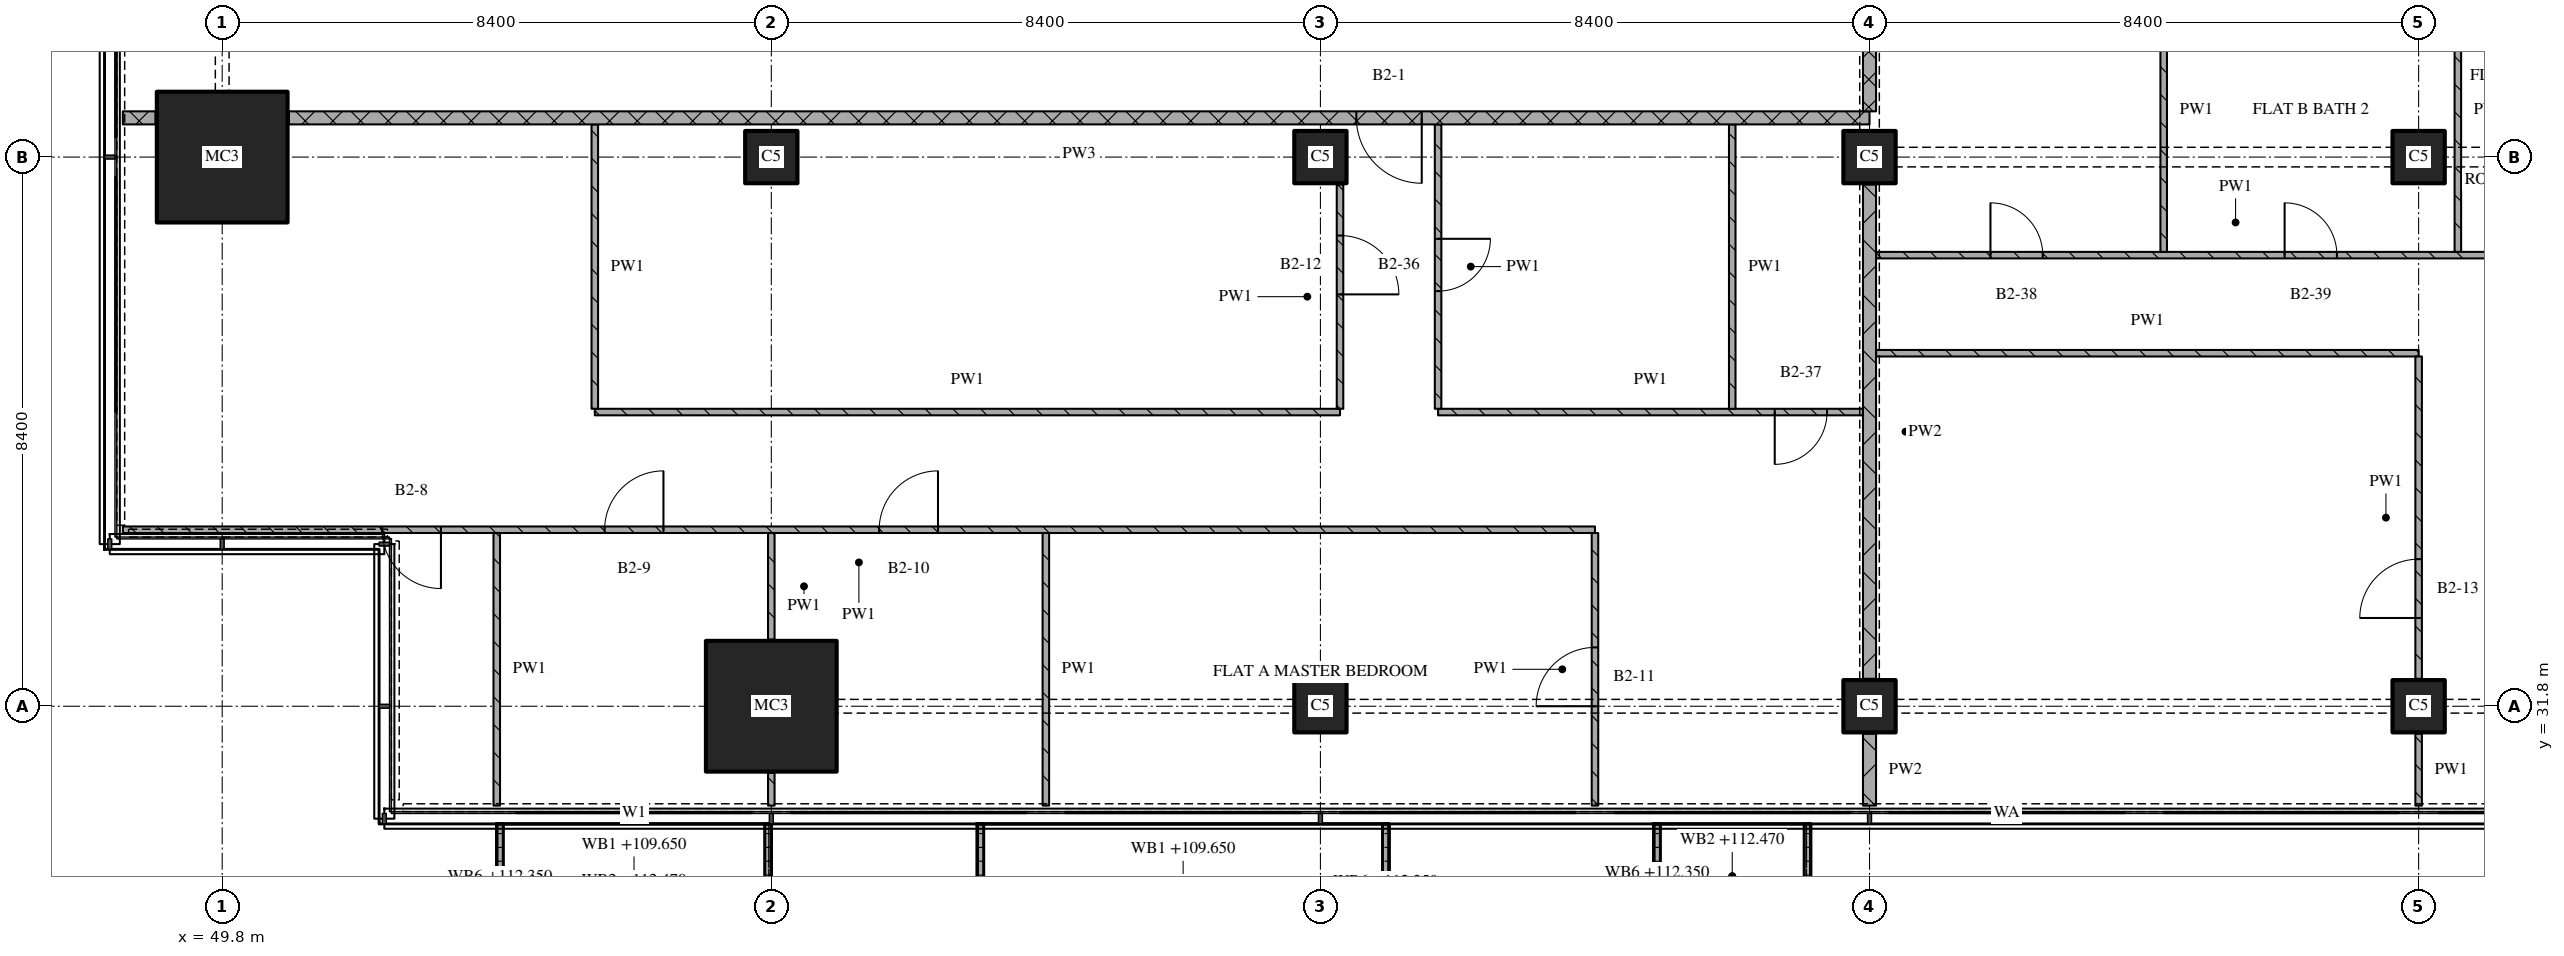
"""IFC4 building model, lengths in metres.
Left out: names, types, materials, properties, quantities, classifications, styles, units other than length and angle.
Written with IfcOpenShell. Run it as: python <this file> out.ifc"""

import sys

from ifc_helpers import new_model, si_unit, direction, frame, frame_2d, origin, origin_2d, place, context, subcontext, project, spatial, polyline, rectangle, outline, extrude, element, fill, save


model = new_model("IFC4")
c1 = context("Model", 3, precision=1e-05, world=origin(), true_north=direction((0.0, 1.0)))
c2 = subcontext(c1, "Body", "Model", "MODEL_VIEW")
j1 = project(units=[si_unit("LENGTHUNIT", "METRE"), si_unit("PLANEANGLEUNIT", "RADIAN")], contexts=[c1])
p1 = place(None, origin())
s1 = spatial("IfcSite", under=j1, at=p1, CompositionType="ELEMENT")
p2 = place(p1, origin())
s2 = spatial("IfcBuilding", under=s1, at=p2, CompositionType="ELEMENT")
p3 = place(p2, frame((0.0, 0.0, 109.65)))
s3 = spatial("IfcBuildingStorey", under=s2, at=p3, CompositionType="ELEMENT", Elevation=109.65)
for number, where, z_axis, x_axis in (
    (1, (49.8, 40.2, 0.0), (0.0, 0.0, 1.0), (1.0, 0.0, 0.0)),
    (2, (58.2, 31.8, 0.0), (0.0, 0.0, 1.0), (1.0, 0.0, 0.0)),
):
    element("IfcColumn", number, at=place(p3, frame(where, z_axis=z_axis, x_axis=x_axis)), inside=s3, PredefinedType="COLUMN", context=c2, shape_type="SweptSolid", body=[
        extrude(rectangle(XDim=2.0, YDim=2.0, at=origin_2d()), origin(), (0.0, 0.0, 1.0), 3.6),
    ])
for number, where, z_axis, x_axis in (
    (3, (58.2, 40.2, 0.0), (0.0, 0.0, 1.0), (1.0, 0.0, 0.0)),
    (4, (66.6, 31.8, 0.0), (0.0, 0.0, 1.0), (1.0, 0.0, 0.0)),
    (5, (66.6, 40.2, 0.0), (0.0, 0.0, 1.0), (1.0, 0.0, 0.0)),
    (6, (75.0, 31.8, 0.0), (0.0, 0.0, 1.0), (1.0, 0.0, 0.0)),
    (7, (75.0, 40.2, 0.0), (0.0, 0.0, 1.0), (1.0, 0.0, 0.0)),
    (8, (83.4, 31.8, 0.0), (0.0, 0.0, 1.0), (1.0, 0.0, 0.0)),
    (9, (83.4, 40.2, 0.0), (0.0, 0.0, 1.0), (1.0, 0.0, 0.0)),
):
    element("IfcColumn", number, at=place(p3, frame(where, z_axis=z_axis, x_axis=x_axis)), inside=s3, PredefinedType="COLUMN", context=c2, shape_type="SweptSolid", body=[
        extrude(rectangle(XDim=0.8, YDim=0.8, at=origin_2d()), origin(), (0.0, 0.0, 1.0), 3.6),
    ])
p4 = place(p3, origin())
e10 = element("IfcWall", 10, at=p4, inside=s3, PredefinedType="SOLIDWALL", context=c2, shape_type="SweptSolid", body=[
    extrude(outline(polyline([(54.0, 30.0), (54.1, 30.0), (54.1, 28.367), (58.1, 28.367), (58.1, 30.0), (58.2, 30.0), (58.2, 28.267), (54.0, 28.267), (54.0, 30.0)])), origin(), (0.0, 0.0, 1.0), 1.0),
])
p5 = place(p3, origin())
e11 = element("IfcWall", 11, at=p5, inside=s3, PredefinedType="SOLIDWALL", context=c2, shape_type="SweptSolid", body=[
    extrude(outline(polyline([(61.35, 30.0), (61.45, 30.0), (61.45, 28.233), (67.55, 28.233), (67.55, 30.0), (67.65, 30.0), (67.65, 28.133), (61.35, 28.133), (61.35, 30.0)])), origin(), (0.0, 0.0, 1.0), 1.0),
])
p6 = place(p3, origin())
e12 = element("IfcWall", 12, at=p6, inside=s3, PredefinedType="SOLIDWALL", context=c2, shape_type="SweptSolid", body=[
    extrude(outline(polyline([(71.7, 30.0), (71.8, 30.0), (71.8, 28.5), (74.0, 28.5), (74.0, 30.0), (74.1, 30.0), (74.1, 28.4), (71.7, 28.4), (71.7, 30.0)])), origin(), (0.0, 0.0, 1.0), 1.0),
])
p7 = place(p3, frame((70.8, 34.5, 0.0), z_axis=(0.0, 0.0, 1.0), x_axis=(-1.0, 0.0, 0.0)))
e13 = element("IfcWall", 13, at=p7, inside=s3, PredefinedType="PARTITIONING", context=c2, shape_type="SweptSolid", body=[
    extrude(rectangle(XDim=22.52, YDim=0.1, at=frame_2d((11.26, 0.0))), origin(), (0.0, 0.0, 1.0), 3.32),
])
p8 = place(p7, frame((10.05, 0.0, 0.0)))
e14 = element("IfcOpeningElement", 14, at=p8, cuts=e13, PredefinedType="OPENING", context=c2, shape_type="SweptSolid", body=[
    extrude(rectangle(XDim=0.9, YDim=2.1, at=frame_2d((0.45, 1.05))), frame((0.0, 0.06, 0.0), z_axis=(0.0, -1.0, 0.0), x_axis=(1.0, 0.0, 0.0)), (0.0, 0.0, 1.0), 0.12),
])
p9 = place(p7, frame((14.25, 0.0, 0.0)))
e15 = element("IfcOpeningElement", 15, at=p9, cuts=e13, PredefinedType="OPENING", context=c2, shape_type="SweptSolid", body=[
    extrude(rectangle(XDim=0.9, YDim=2.1, at=frame_2d((0.45, 1.05))), frame((0.0, 0.06, 0.0), z_axis=(0.0, -1.0, 0.0), x_axis=(1.0, 0.0, 0.0)), (0.0, 0.0, 1.0), 0.12),
])
p10 = place(p7, frame((17.654, 0.0, 0.0)))
e16 = element("IfcOpeningElement", 16, at=p10, cuts=e13, PredefinedType="OPENING", context=c2, shape_type="SweptSolid", body=[
    extrude(rectangle(XDim=0.9, YDim=2.1, at=frame_2d((0.45, 1.05))), frame((0.0, 0.06, 0.0), z_axis=(0.0, -1.0, 0.0), x_axis=(1.0, 0.0, 0.0)), (0.0, 0.0, 1.0), 0.12),
])
p11 = place(p3, frame((55.5, 36.3, 0.0), z_axis=(0.0, 0.0, 1.0), x_axis=(1.0, 0.0, 0.0)))
e17 = element("IfcWall", 17, at=p11, inside=s3, PredefinedType="PARTITIONING", context=c2, shape_type="SweptSolid", body=[
    extrude(rectangle(XDim=11.4, YDim=0.1, at=frame_2d((5.7, 0.0))), origin(), (0.0, 0.0, 1.0), 3.32),
])
p12 = place(p3, frame((68.4, 36.3, 0.0), z_axis=(0.0, 0.0, 1.0), x_axis=(1.0, 0.0, 0.0)))
e18 = element("IfcWall", 18, at=p12, inside=s3, PredefinedType="PARTITIONING", context=c2, shape_type="SweptSolid", body=[
    extrude(rectangle(XDim=6.5, YDim=0.1, at=frame_2d((3.25, 0.0))), origin(), (0.0, 0.0, 1.0), 3.32),
])
p13 = place(p12, frame((5.15, 0.0, 0.0)))
e19 = element("IfcOpeningElement", 19, at=p13, cuts=e18, PredefinedType="OPENING", context=c2, shape_type="SweptSolid", body=[
    extrude(rectangle(XDim=0.8, YDim=2.1, at=frame_2d((0.4, 1.05))), frame((0.0, 0.06, 0.0), z_axis=(0.0, -1.0, 0.0), x_axis=(1.0, 0.0, 0.0)), (0.0, 0.0, 1.0), 0.12),
])
p14 = place(p3, frame((75.1, 37.2, 0.0), z_axis=(0.0, 0.0, 1.0), x_axis=(1.0, 0.0, 0.0)))
e20 = element("IfcWall", 20, at=p14, inside=s3, PredefinedType="PARTITIONING", context=c2, shape_type="SweptSolid", body=[
    extrude(rectangle(XDim=8.3, YDim=0.1, at=frame_2d((4.15, 0.0))), origin(), (0.0, 0.0, 1.0), 3.32),
])
p15 = place(p3, frame((75.1, 38.7, 0.0), z_axis=(0.0, 0.0, 1.0), x_axis=(1.0, 0.0, 0.0)))
e21 = element("IfcWall", 21, at=p15, inside=s3, PredefinedType="PARTITIONING", context=c2, shape_type="SweptSolid", body=[
    extrude(rectangle(XDim=11.0, YDim=0.1, at=frame_2d((5.5, 0.0))), origin(), (0.0, 0.0, 1.0), 3.32),
])
p16 = place(p15, frame((1.75, 0.0, 0.0)))
e22 = element("IfcOpeningElement", 22, at=p16, cuts=e21, PredefinedType="OPENING", context=c2, shape_type="SweptSolid", body=[
    extrude(rectangle(XDim=0.8, YDim=2.1, at=frame_2d((0.4, 1.05))), frame((0.0, 0.06, 0.0), z_axis=(0.0, -1.0, 0.0), x_axis=(1.0, 0.0, 0.0)), (0.0, 0.0, 1.0), 0.12),
])
p17 = place(p15, frame((6.25, 0.0, 0.0)))
e23 = element("IfcOpeningElement", 23, at=p17, cuts=e21, PredefinedType="OPENING", context=c2, shape_type="SweptSolid", body=[
    extrude(rectangle(XDim=0.8, YDim=2.1, at=frame_2d((0.4, 1.05))), frame((0.0, 0.06, 0.0), z_axis=(0.0, -1.0, 0.0), x_axis=(1.0, 0.0, 0.0)), (0.0, 0.0, 1.0), 0.12),
])
p18 = place(p3, frame((48.28, 40.8, 0.0), z_axis=(0.0, 0.0, 1.0), x_axis=(1.0, 0.0, 0.0)))
e24 = element("IfcWall", 24, at=p18, inside=s3, PredefinedType="PARTITIONING", context=c2, shape_type="SweptSolid", body=[
    extrude(rectangle(XDim=0.5, YDim=0.2, at=frame_2d((0.25, 0.0))), origin(), (0.0, 0.0, 1.0), 3.32),
])
p19 = place(p3, frame((75.0, 40.8, 0.0), z_axis=(0.0, 0.0, 1.0), x_axis=(-1.0, 0.0, 0.0)))
e25 = element("IfcWall", 25, at=p19, inside=s3, PredefinedType="PARTITIONING", context=c2, shape_type="SweptSolid", body=[
    extrude(rectangle(XDim=24.18, YDim=0.2, at=frame_2d((12.09, 0.0))), origin(), (0.0, 0.0, 1.0), 3.32),
])
p20 = place(p19, frame((6.85, 0.0, 0.0)))
e26 = element("IfcOpeningElement", 26, at=p20, cuts=e25, PredefinedType="OPENING", context=c2, shape_type="SweptSolid", body=[
    extrude(rectangle(XDim=1.0, YDim=2.1, at=frame_2d((0.5, 1.05))), frame((0.0, 0.11, 0.0), z_axis=(0.0, -1.0, 0.0), x_axis=(1.0, 0.0, 0.0)), (0.0, 0.0, 1.0), 0.22),
])
p21 = place(p3, frame((54.0, 34.45, 0.0), z_axis=(0.0, 0.0, 1.0), x_axis=(0.0, -1.0, 0.0)))
e27 = element("IfcWall", 27, at=p21, inside=s3, PredefinedType="PARTITIONING", context=c2, shape_type="SweptSolid", body=[
    extrude(rectangle(XDim=4.17, YDim=0.1, at=frame_2d((2.085, 0.0))), origin(), (0.0, 0.0, 1.0), 3.32),
])
p22 = place(p3, frame((55.5, 40.7, 0.0), z_axis=(0.0, 0.0, 1.0), x_axis=(0.0, -1.0, 0.0)))
e28 = element("IfcWall", 28, at=p22, inside=s3, PredefinedType="PARTITIONING", context=c2, shape_type="SweptSolid", body=[
    extrude(rectangle(XDim=4.35, YDim=0.1, at=frame_2d((2.175, 0.0))), origin(), (0.0, 0.0, 1.0), 3.32),
])
p23 = place(p3, frame((58.2, 30.78, 0.0), z_axis=(0.0, 0.0, 1.0), x_axis=(0.0, -1.0, 0.0)))
e29 = element("IfcWall", 29, at=p23, inside=s3, PredefinedType="PARTITIONING", context=c2, shape_type="SweptSolid", body=[
    extrude(rectangle(XDim=0.5, YDim=0.1, at=frame_2d((0.25, 0.0))), origin(), (0.0, 0.0, 1.0), 3.32),
])
p24 = place(p3, frame((58.2, 34.45, 0.0), z_axis=(0.0, 0.0, 1.0), x_axis=(0.0, -1.0, 0.0)))
e30 = element("IfcWall", 30, at=p24, inside=s3, PredefinedType="PARTITIONING", context=c2, shape_type="SweptSolid", body=[
    extrude(rectangle(XDim=1.63, YDim=0.1, at=frame_2d((0.815, 0.0))), origin(), (0.0, 0.0, 1.0), 3.32),
])
p25 = place(p3, frame((62.4, 34.45, 0.0), z_axis=(0.0, 0.0, 1.0), x_axis=(0.0, -1.0, 0.0)))
e31 = element("IfcWall", 31, at=p25, inside=s3, PredefinedType="PARTITIONING", context=c2, shape_type="SweptSolid", body=[
    extrude(rectangle(XDim=4.17, YDim=0.1, at=frame_2d((2.085, 0.0))), origin(), (0.0, 0.0, 1.0), 3.32),
])
p26 = place(p3, frame((66.9, 36.35, 0.0), z_axis=(0.0, 0.0, 1.0), x_axis=(0.0, 1.0, 0.0)))
e32 = element("IfcWall", 32, at=p26, inside=s3, PredefinedType="PARTITIONING", context=c2, shape_type="SweptSolid", body=[
    extrude(rectangle(XDim=3.43, YDim=0.1, at=frame_2d((1.715, 0.0))), origin(), (0.0, 0.0, 1.0), 3.32),
])
p27 = place(p26, frame((1.75, 0.0, 0.0)))
e33 = element("IfcOpeningElement", 33, at=p27, cuts=e32, PredefinedType="OPENING", context=c2, shape_type="SweptSolid", body=[
    extrude(rectangle(XDim=0.9, YDim=2.1, at=frame_2d((0.45, 1.05))), frame((0.0, 0.06, 0.0), z_axis=(0.0, -1.0, 0.0), x_axis=(1.0, 0.0, 0.0)), (0.0, 0.0, 1.0), 0.12),
])
p28 = place(p3, frame((68.4, 40.7, 0.0), z_axis=(0.0, 0.0, 1.0), x_axis=(0.0, -1.0, 0.0)))
e34 = element("IfcWall", 34, at=p28, inside=s3, PredefinedType="PARTITIONING", context=c2, shape_type="SweptSolid", body=[
    extrude(rectangle(XDim=4.35, YDim=0.1, at=frame_2d((2.175, 0.0))), origin(), (0.0, 0.0, 1.0), 3.32),
])
p29 = place(p28, frame((1.75, 0.0, 0.0)))
e35 = element("IfcOpeningElement", 35, at=p29, cuts=e34, PredefinedType="OPENING", context=c2, shape_type="SweptSolid", body=[
    extrude(rectangle(XDim=0.8, YDim=2.1, at=frame_2d((0.4, 1.05))), frame((0.0, 0.06, 0.0), z_axis=(0.0, -1.0, 0.0), x_axis=(1.0, 0.0, 0.0)), (0.0, 0.0, 1.0), 0.12),
])
p30 = place(p3, frame((70.8, 30.28, 0.0), z_axis=(0.0, 0.0, 1.0), x_axis=(0.0, 1.0, 0.0)))
e36 = element("IfcWall", 36, at=p30, inside=s3, PredefinedType="PARTITIONING", context=c2, shape_type="SweptSolid", body=[
    extrude(rectangle(XDim=4.17, YDim=0.1, at=frame_2d((2.085, 0.0))), origin(), (0.0, 0.0, 1.0), 3.32),
])
p31 = place(p30, frame((1.52, 0.0, 0.0)))
e37 = element("IfcOpeningElement", 37, at=p31, cuts=e36, PredefinedType="OPENING", context=c2, shape_type="SweptSolid", body=[
    extrude(rectangle(XDim=0.9, YDim=2.1, at=frame_2d((0.45, 1.05))), frame((0.0, 0.06, 0.0), z_axis=(0.0, -1.0, 0.0), x_axis=(1.0, 0.0, 0.0)), (0.0, 0.0, 1.0), 0.12),
])
p32 = place(p3, frame((72.9, 40.7, 0.0), z_axis=(0.0, 0.0, 1.0), x_axis=(0.0, -1.0, 0.0)))
e38 = element("IfcWall", 38, at=p32, inside=s3, PredefinedType="PARTITIONING", context=c2, shape_type="SweptSolid", body=[
    extrude(rectangle(XDim=4.35, YDim=0.1, at=frame_2d((2.175, 0.0))), origin(), (0.0, 0.0, 1.0), 3.32),
])
p33 = place(p3, frame((75.0, 43.1, 0.0), z_axis=(0.0, 0.0, 1.0), x_axis=(0.0, -1.0, 0.0)))
e39 = element("IfcWall", 39, at=p33, inside=s3, PredefinedType="PARTITIONING", context=c2, shape_type="SweptSolid", body=[
    extrude(rectangle(XDim=2.2, YDim=0.2, at=frame_2d((1.1, 0.0))), origin(), (0.0, 0.0, 1.0), 2.43),
])
p34 = place(p3, frame((75.0, 31.38, 0.0), z_axis=(0.0, 0.0, 1.0), x_axis=(0.0, -1.0, 0.0)))
e40 = element("IfcWall", 40, at=p34, inside=s3, PredefinedType="PARTITIONING", context=c2, shape_type="SweptSolid", body=[
    extrude(rectangle(XDim=1.1, YDim=0.2, at=frame_2d((0.55, 0.0))), origin(), (0.0, 0.0, 1.0), 3.32),
])
p35 = place(p3, frame((75.0, 39.78, 0.0), z_axis=(0.0, 0.0, 1.0), x_axis=(0.0, -1.0, 0.0)))
e41 = element("IfcWall", 41, at=p35, inside=s3, PredefinedType="PARTITIONING", context=c2, shape_type="SweptSolid", body=[
    extrude(rectangle(XDim=7.56, YDim=0.2, at=frame_2d((3.78, 0.0))), origin(), (0.0, 0.0, 1.0), 2.83),
])
p36 = place(p3, frame((79.5, 43.1, 0.0), z_axis=(0.0, 0.0, 1.0), x_axis=(0.0, -1.0, 0.0)))
e42 = element("IfcWall", 42, at=p36, inside=s3, PredefinedType="PARTITIONING", context=c2, shape_type="SweptSolid", body=[
    extrude(rectangle(XDim=4.35, YDim=0.1, at=frame_2d((2.175, 0.0))), origin(), (0.0, 0.0, 1.0), 3.32),
])
p37 = place(p3, frame((83.4, 31.38, 0.0), z_axis=(0.0, 0.0, 1.0), x_axis=(0.0, -1.0, 0.0)))
e43 = element("IfcWall", 43, at=p37, inside=s3, PredefinedType="PARTITIONING", context=c2, shape_type="SweptSolid", body=[
    extrude(rectangle(XDim=1.1, YDim=0.1, at=frame_2d((0.55, 0.0))), origin(), (0.0, 0.0, 1.0), 3.32),
])
p38 = place(p3, frame((83.4, 32.22, 0.0), z_axis=(0.0, 0.0, 1.0), x_axis=(0.0, 1.0, 0.0)))
e44 = element("IfcWall", 44, at=p38, inside=s3, PredefinedType="PARTITIONING", context=c2, shape_type="SweptSolid", body=[
    extrude(rectangle(XDim=4.93, YDim=0.1, at=frame_2d((2.465, 0.0))), origin(), (0.0, 0.0, 1.0), 3.32),
])
p39 = place(p38, frame((0.93, 0.0, 0.0)))
e45 = element("IfcOpeningElement", 45, at=p39, cuts=e44, PredefinedType="OPENING", context=c2, shape_type="SweptSolid", body=[
    extrude(rectangle(XDim=0.9, YDim=2.1, at=frame_2d((0.45, 1.05))), frame((0.0, 0.06, 0.0), z_axis=(0.0, -1.0, 0.0), x_axis=(1.0, 0.0, 0.0)), (0.0, 0.0, 1.0), 0.12),
])
p40 = place(p3, frame((84.0, 43.1, 0.0), z_axis=(0.0, 0.0, 1.0), x_axis=(0.0, -1.0, 0.0)))
e46 = element("IfcWall", 46, at=p40, inside=s3, PredefinedType="PARTITIONING", context=c2, shape_type="SweptSolid", body=[
    extrude(rectangle(XDim=4.35, YDim=0.1, at=frame_2d((2.175, 0.0))), origin(), (0.0, 0.0, 1.0), 3.32),
])
p41 = place(p8, origin())
e47 = element("IfcDoor", 47, at=p41, inside=s3, OperationType="SINGLE_SWING_RIGHT", PredefinedType="DOOR", context=c2, shape_type="SweptSolid", body=[
    extrude(rectangle(XDim=0.9, YDim=2.1, at=frame_2d((0.45, 1.05))), frame((0.0, 0.025, 0.0), z_axis=(0.0, -1.0, 0.0), x_axis=(1.0, 0.0, 0.0)), (0.0, 0.0, 1.0), 0.05),
])
fill(e14, e47)
p42 = place(p9, origin())
e48 = element("IfcDoor", 48, at=p42, inside=s3, OperationType="SINGLE_SWING_RIGHT", PredefinedType="DOOR", context=c2, shape_type="SweptSolid", body=[
    extrude(rectangle(XDim=0.9, YDim=2.1, at=frame_2d((0.45, 1.05))), frame((0.0, 0.025, 0.0), z_axis=(0.0, -1.0, 0.0), x_axis=(1.0, 0.0, 0.0)), (0.0, 0.0, 1.0), 0.05),
])
fill(e15, e48)
p43 = place(p10, origin())
e49 = element("IfcDoor", 49, at=p43, inside=s3, OperationType="SINGLE_SWING_LEFT", PredefinedType="DOOR", context=c2, shape_type="SweptSolid", body=[
    extrude(rectangle(XDim=0.9, YDim=2.1, at=frame_2d((0.45, 1.05))), frame((0.0, 0.025, 0.0), z_axis=(0.0, -1.0, 0.0), x_axis=(1.0, 0.0, 0.0)), (0.0, 0.0, 1.0), 0.05),
])
fill(e16, e49)
p44 = place(p13, origin())
e50 = element("IfcDoor", 50, at=p44, inside=s3, OperationType="SINGLE_SWING_RIGHT", PredefinedType="DOOR", context=c2, shape_type="SweptSolid", body=[
    extrude(rectangle(XDim=0.8, YDim=2.1, at=frame_2d((0.4, 1.05))), frame((0.0, 0.025, 0.0), z_axis=(0.0, -1.0, 0.0), x_axis=(1.0, 0.0, 0.0)), (0.0, 0.0, 1.0), 0.05),
])
fill(e19, e50)
p45 = place(p16, origin())
e51 = element("IfcDoor", 51, at=p45, inside=s3, OperationType="SINGLE_SWING_LEFT", PredefinedType="DOOR", context=c2, shape_type="SweptSolid", body=[
    extrude(rectangle(XDim=0.8, YDim=2.1, at=frame_2d((0.4, 1.05))), frame((0.0, 0.025, 0.0), z_axis=(0.0, -1.0, 0.0), x_axis=(1.0, 0.0, 0.0)), (0.0, 0.0, 1.0), 0.05),
])
fill(e22, e51)
p46 = place(p17, origin())
e52 = element("IfcDoor", 52, at=p46, inside=s3, OperationType="SINGLE_SWING_LEFT", PredefinedType="DOOR", context=c2, shape_type="SweptSolid", body=[
    extrude(rectangle(XDim=0.8, YDim=2.1, at=frame_2d((0.4, 1.05))), frame((0.0, 0.025, 0.0), z_axis=(0.0, -1.0, 0.0), x_axis=(1.0, 0.0, 0.0)), (0.0, 0.0, 1.0), 0.05),
])
fill(e23, e52)
p47 = place(p20, origin())
e53 = element("IfcDoor", 53, at=p47, inside=s3, OperationType="SINGLE_SWING_LEFT", PredefinedType="DOOR", context=c2, shape_type="SweptSolid", body=[
    extrude(rectangle(XDim=1.0, YDim=2.1, at=frame_2d((0.5, 1.05))), frame((0.0, 0.025, 0.0), z_axis=(0.0, -1.0, 0.0), x_axis=(1.0, 0.0, 0.0)), (0.0, 0.0, 1.0), 0.05),
])
fill(e26, e53)
p48 = place(p27, origin())
e54 = element("IfcDoor", 54, at=p48, inside=s3, OperationType="SINGLE_SWING_RIGHT", PredefinedType="DOOR", context=c2, shape_type="SweptSolid", body=[
    extrude(rectangle(XDim=0.9, YDim=2.1, at=frame_2d((0.45, 1.05))), frame((0.0, 0.025, 0.0), z_axis=(0.0, -1.0, 0.0), x_axis=(1.0, 0.0, 0.0)), (0.0, 0.0, 1.0), 0.05),
])
fill(e33, e54)
p49 = place(p29, origin())
e55 = element("IfcDoor", 55, at=p49, inside=s3, OperationType="SINGLE_SWING_LEFT", PredefinedType="DOOR", context=c2, shape_type="SweptSolid", body=[
    extrude(rectangle(XDim=0.8, YDim=2.1, at=frame_2d((0.4, 1.05))), frame((0.0, 0.025, 0.0), z_axis=(0.0, -1.0, 0.0), x_axis=(1.0, 0.0, 0.0)), (0.0, 0.0, 1.0), 0.05),
])
fill(e35, e55)
p50 = place(p31, origin())
e56 = element("IfcDoor", 56, at=p50, inside=s3, OperationType="SINGLE_SWING_LEFT", PredefinedType="DOOR", context=c2, shape_type="SweptSolid", body=[
    extrude(rectangle(XDim=0.9, YDim=2.1, at=frame_2d((0.45, 1.05))), frame((0.0, 0.025, 0.0), z_axis=(0.0, -1.0, 0.0), x_axis=(1.0, 0.0, 0.0)), (0.0, 0.0, 1.0), 0.05),
])
fill(e37, e56)
p51 = place(p39, origin())
e57 = element("IfcDoor", 57, at=p51, inside=s3, OperationType="SINGLE_SWING_LEFT", PredefinedType="DOOR", context=c2, shape_type="SweptSolid", body=[
    extrude(rectangle(XDim=0.9, YDim=2.1, at=frame_2d((0.45, 1.05))), frame((0.0, 0.025, 0.0), z_axis=(0.0, -1.0, 0.0), x_axis=(1.0, 0.0, 0.0)), (0.0, 0.0, 1.0), 0.05),
])
fill(e45, e57)
save(model, sys.argv[1])
